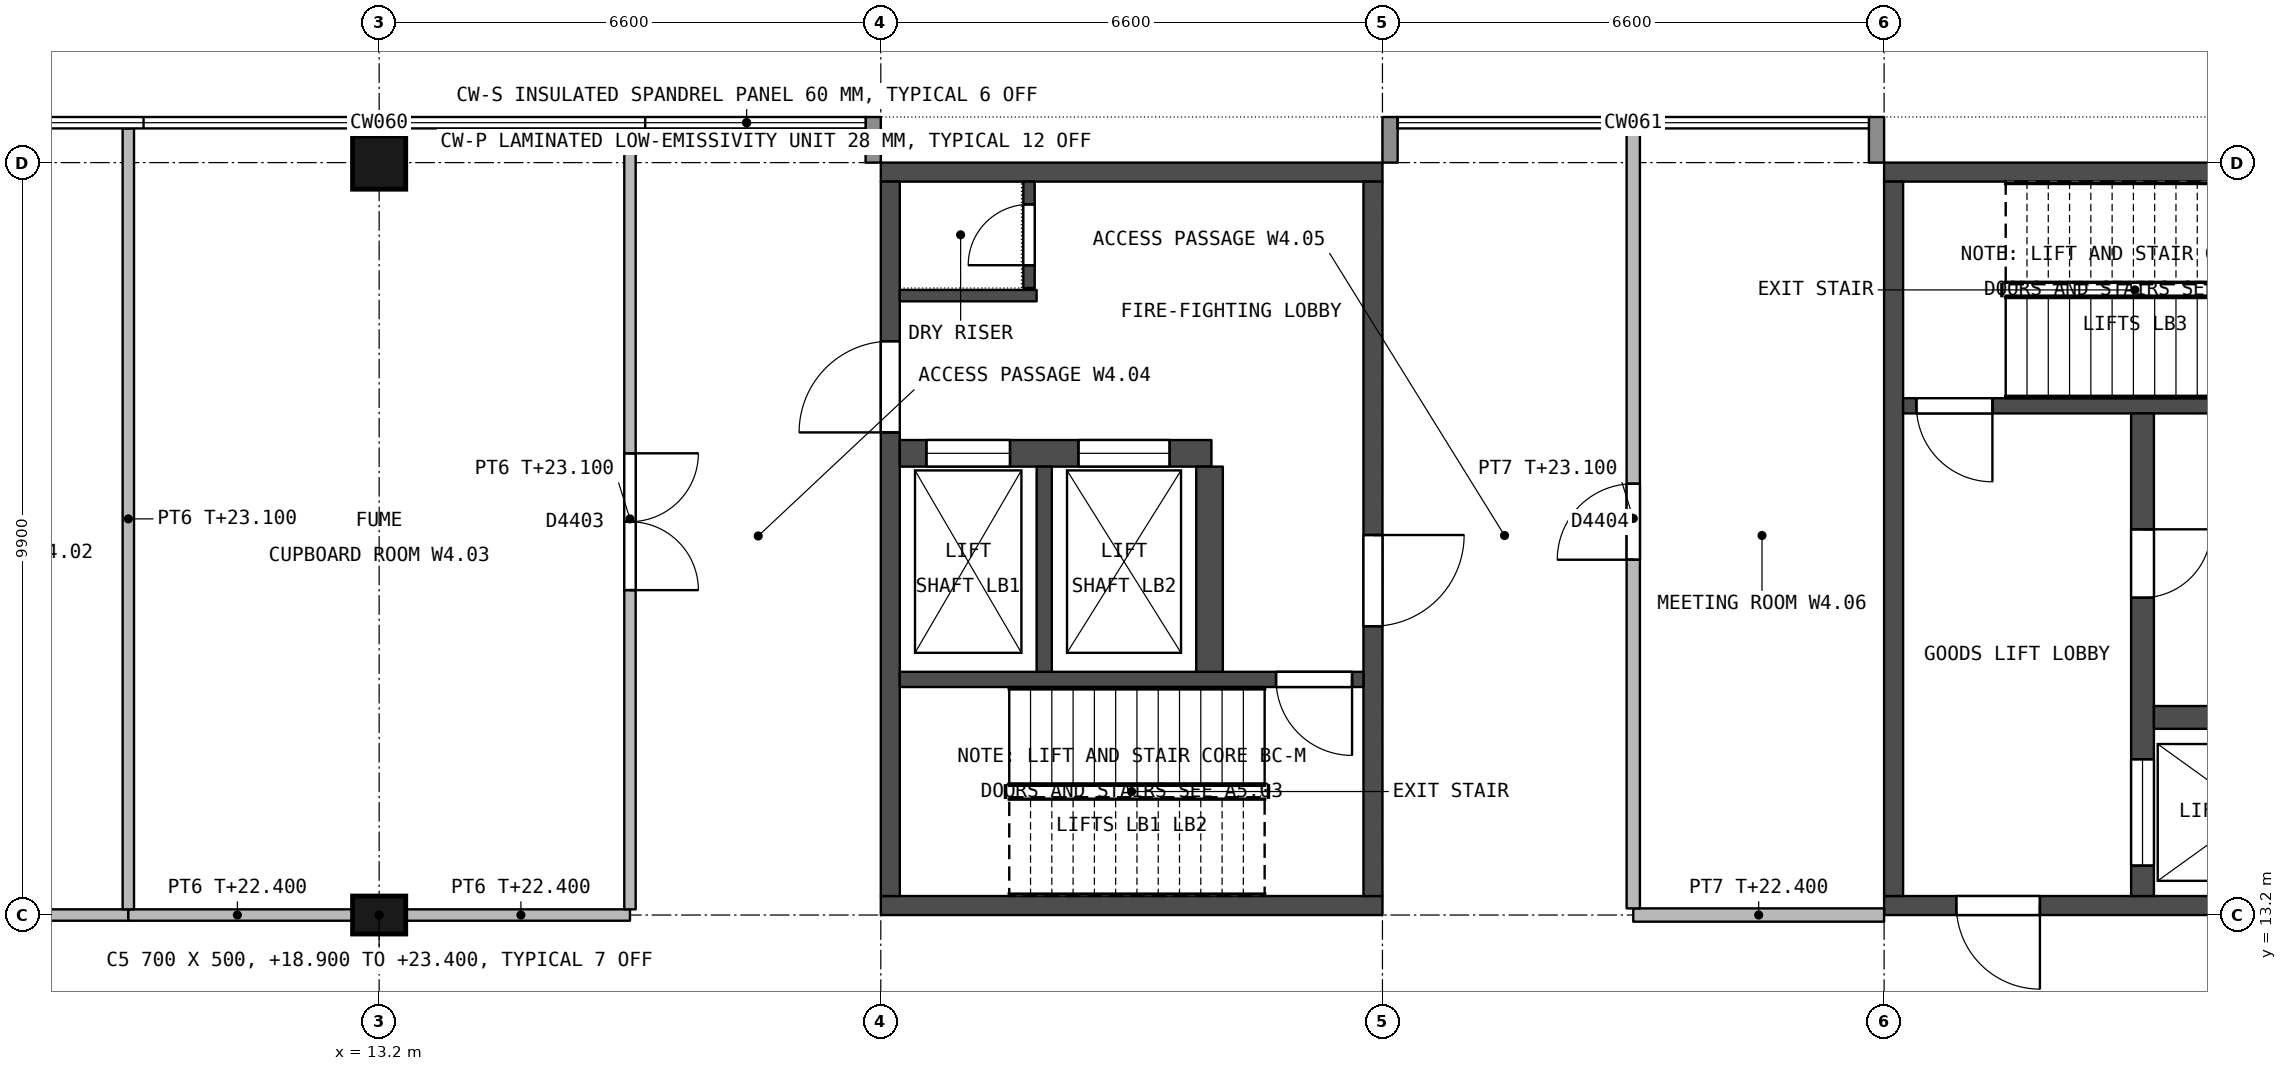
"""IFC4 building model, lengths in metres.
Left out: names, types, materials, properties, quantities, classifications, styles, units other than length and angle.
Written with IfcOpenShell. Run it as: python <this file> out.ifc"""

import sys

from ifc_helpers import new_model, si_unit, direction, frame, frame_2d, origin, origin_2d, place, context, subcontext, project, spatial, rectangle, extrude, element, fill, save


model = new_model("IFC4")
c1 = context("Model", 3, precision=1e-05, world=origin(), true_north=direction((0.0, 1.0)))
c2 = subcontext(c1, "Body", "Model", "MODEL_VIEW")
j1 = project(units=[si_unit("LENGTHUNIT", "METRE"), si_unit("PLANEANGLEUNIT", "RADIAN")], contexts=[c1])
p1 = place(None, origin())
s1 = spatial("IfcSite", under=j1, at=p1, CompositionType="ELEMENT")
p2 = place(p1, origin())
s2 = spatial("IfcBuilding", under=s1, at=p2, CompositionType="ELEMENT")
p3 = place(p2, frame((0.0, 0.0, 18.9)))
s3 = spatial("IfcBuildingStorey", under=s2, at=p3, CompositionType="ELEMENT", Elevation=18.9)
p4 = place(p3, frame((13.2, 13.2, 0.0), z_axis=(0.0, 0.0, 1.0), x_axis=(1.0, 0.0, 0.0)))
e1 = element("IfcColumn", 1, at=p4, inside=s3, PredefinedType="COLUMN", context=c2, shape_type="SweptSolid", body=[
    extrude(rectangle(XDim=0.7, YDim=0.5, at=origin_2d()), origin(), (0.0, 0.0, 1.0), 4.5),
])
p5 = place(p3, frame((13.2, 23.1, 0.0), z_axis=(0.0, 0.0, 1.0), x_axis=(1.0, 0.0, 0.0)))
e2 = element("IfcColumn", 2, at=p5, inside=s3, PredefinedType="COLUMN", context=c2, shape_type="SweptSolid", body=[
    extrude(rectangle(XDim=0.7, YDim=0.7, at=origin_2d()), origin(), (0.0, 0.0, 1.0), 4.5),
])
for number, where, z_axis, x_axis in (
    (3, (19.8, 13.325, 0.0), (0.0, 0.0, 1.0), (1.0, 0.0, 0.0)),
    (4, (19.8, 22.975, 0.0), (0.0, 0.0, 1.0), (1.0, 0.0, 0.0)),
):
    element("IfcWall", number, at=place(p3, frame(where, z_axis=z_axis, x_axis=x_axis)), inside=s3, PredefinedType="SHEAR", context=c2, shape_type="SweptSolid", body=[
        extrude(rectangle(XDim=6.6, YDim=0.25, at=frame_2d((3.3, 0.0))), origin(), (0.0, 0.0, 1.0), 4.2),
    ])
p6 = place(p3, frame((19.925, 13.45, 0.0), z_axis=(0.0, 0.0, 1.0), x_axis=(0.0, 1.0, 0.0)))
e5 = element("IfcWall", 5, at=p6, inside=s3, PredefinedType="SHEAR", context=c2, shape_type="SweptSolid", body=[
    extrude(rectangle(XDim=9.4, YDim=0.25, at=frame_2d((4.7, 0.0))), origin(), (0.0, 0.0, 1.0), 4.2),
])
p7 = place(p6, frame((6.1, 0.0, 0.0)))
e6 = element("IfcOpeningElement", 6, at=p7, cuts=e5, PredefinedType="OPENING", context=c2, shape_type="SweptSolid", body=[
    extrude(rectangle(XDim=1.2, YDim=2.1, at=frame_2d((0.6, 1.05))), frame((0.0, 0.135, 0.0), z_axis=(0.0, -1.0, 0.0), x_axis=(1.0, 0.0, 0.0)), (0.0, 0.0, 1.0), 0.27),
])
p8 = place(p3, frame((26.275, 13.45, 0.0), z_axis=(0.0, 0.0, 1.0), x_axis=(0.0, 1.0, 0.0)))
e7 = element("IfcWall", 7, at=p8, inside=s3, PredefinedType="SHEAR", context=c2, shape_type="SweptSolid", body=[
    extrude(rectangle(XDim=9.4, YDim=0.25, at=frame_2d((4.7, 0.0))), origin(), (0.0, 0.0, 1.0), 4.2),
])
p9 = place(p8, frame((3.55, 0.0, 0.0)))
e8 = element("IfcOpeningElement", 8, at=p9, cuts=e7, PredefinedType="OPENING", context=c2, shape_type="SweptSolid", body=[
    extrude(rectangle(XDim=1.2, YDim=2.1, at=frame_2d((0.6, 1.05))), frame((0.0, 0.135, 0.0), z_axis=(0.0, -1.0, 0.0), x_axis=(1.0, 0.0, 0.0)), (0.0, 0.0, 1.0), 0.27),
])
p10 = place(p3, frame((20.05, 16.3, 0.0), z_axis=(0.0, 0.0, 1.0), x_axis=(1.0, 0.0, 0.0)))
e9 = element("IfcWall", 9, at=p10, inside=s3, PredefinedType="SHEAR", context=c2, shape_type="SweptSolid", body=[
    extrude(rectangle(XDim=6.1, YDim=0.2, at=frame_2d((3.05, 0.0))), origin(), (0.0, 0.0, 1.0), 4.2),
])
p11 = place(p10, frame((4.95, 0.0, 0.0)))
e10 = element("IfcOpeningElement", 10, at=p11, cuts=e9, PredefinedType="OPENING", context=c2, shape_type="SweptSolid", body=[
    extrude(rectangle(XDim=1.0, YDim=2.2, at=frame_2d((0.5, 1.1))), frame((0.0, 0.11, 0.0), z_axis=(0.0, -1.0, 0.0), x_axis=(1.0, 0.0, 0.0)), (0.0, 0.0, 1.0), 0.22),
])
p12 = place(p3, frame((20.05, 19.275, 0.0), z_axis=(0.0, 0.0, 1.0), x_axis=(1.0, 0.0, 0.0)))
e11 = element("IfcWall", 11, at=p12, inside=s3, PredefinedType="SHEAR", context=c2, shape_type="SweptSolid", body=[
    extrude(rectangle(XDim=4.1, YDim=0.35, at=frame_2d((2.05, 0.0))), origin(), (0.0, 0.0, 1.0), 4.2),
])
p13 = place(p12, frame((0.35, 0.0, 0.0)))
e12 = element("IfcOpeningElement", 12, at=p13, cuts=e11, PredefinedType="OPENING", context=c2, shape_type="SweptSolid", body=[
    extrude(rectangle(XDim=1.1, YDim=2.2, at=frame_2d((0.55, 1.1))), frame((0.0, 0.185, 0.0), z_axis=(0.0, -1.0, 0.0), x_axis=(1.0, 0.0, 0.0)), (0.0, 0.0, 1.0), 0.37),
])
p14 = place(p12, frame((2.35, 0.0, 0.0)))
e13 = element("IfcOpeningElement", 13, at=p14, cuts=e11, PredefinedType="OPENING", context=c2, shape_type="SweptSolid", body=[
    extrude(rectangle(XDim=1.2, YDim=2.3, at=frame_2d((0.6, 1.15))), frame((0.0, 0.185, 0.0), z_axis=(0.0, -1.0, 0.0), x_axis=(1.0, 0.0, 0.0)), (0.0, 0.0, 1.0), 0.37),
])
p15 = place(p3, frame((21.95, 16.4, 0.0), z_axis=(0.0, 0.0, 1.0), x_axis=(0.0, 1.0, 0.0)))
e14 = element("IfcWall", 14, at=p15, inside=s3, PredefinedType="SHEAR", context=c2, shape_type="SweptSolid", body=[
    extrude(rectangle(XDim=2.7, YDim=0.2, at=frame_2d((1.35, 0.0))), origin(), (0.0, 0.0, 1.0), 4.2),
])
p16 = place(p3, frame((24.125, 16.4, 0.0), z_axis=(0.0, 0.0, 1.0), x_axis=(0.0, 1.0, 0.0)))
e15 = element("IfcWall", 15, at=p16, inside=s3, PredefinedType="SHEAR", context=c2, shape_type="SweptSolid", body=[
    extrude(rectangle(XDim=2.7, YDim=0.35, at=frame_2d((1.35, 0.0))), origin(), (0.0, 0.0, 1.0), 4.2),
])
p17 = place(p3, frame((20.05, 21.35, 0.0), z_axis=(0.0, 0.0, 1.0), x_axis=(1.0, 0.0, 0.0)))
e16 = element("IfcWall", 16, at=p17, inside=s3, PredefinedType="SHEAR", context=c2, shape_type="SweptSolid", body=[
    extrude(rectangle(XDim=1.8, YDim=0.15, at=frame_2d((0.9, 0.0))), origin(), (0.0, 0.0, 1.0), 4.2),
])
p18 = place(p3, frame((21.75, 21.45, 0.0), z_axis=(0.0, 0.0, 1.0), x_axis=(0.0, 1.0, 0.0)))
e17 = element("IfcWall", 17, at=p18, inside=s3, PredefinedType="SHEAR", context=c2, shape_type="SweptSolid", body=[
    extrude(rectangle(XDim=1.4, YDim=0.15, at=frame_2d((0.7, 0.0))), origin(), (0.0, 0.0, 1.0), 4.2),
])
p19 = place(p18, frame((0.3, 0.0, 0.0)))
e18 = element("IfcOpeningElement", 18, at=p19, cuts=e17, PredefinedType="OPENING", context=c2, shape_type="SweptSolid", body=[
    extrude(rectangle(XDim=0.8, YDim=2.0, at=frame_2d((0.4, 1.0))), frame((0.0, 0.085, 0.0), z_axis=(0.0, -1.0, 0.0), x_axis=(1.0, 0.0, 0.0)), (0.0, 0.0, 1.0), 0.17),
])
p20 = place(p3, frame((33.0, 13.325, 0.0), z_axis=(0.0, 0.0, 1.0), x_axis=(1.0, 0.0, 0.0)))
e19 = element("IfcWall", 19, at=p20, inside=s3, PredefinedType="SHEAR", context=c2, shape_type="SweptSolid", body=[
    extrude(rectangle(XDim=6.6, YDim=0.25, at=frame_2d((3.3, 0.0))), origin(), (0.0, 0.0, 1.0), 4.2),
])
p21 = place(p20, frame((0.95, 0.0, 0.0)))
e20 = element("IfcOpeningElement", 20, at=p21, cuts=e19, PredefinedType="OPENING", context=c2, shape_type="SweptSolid", body=[
    extrude(rectangle(XDim=1.1, YDim=2.1, at=frame_2d((0.55, 1.05))), frame((0.0, 0.135, 0.0), z_axis=(0.0, -1.0, 0.0), x_axis=(1.0, 0.0, 0.0)), (0.0, 0.0, 1.0), 0.27),
])
p22 = place(p3, frame((33.0, 22.975, 0.0), z_axis=(0.0, 0.0, 1.0), x_axis=(1.0, 0.0, 0.0)))
e21 = element("IfcWall", 21, at=p22, inside=s3, PredefinedType="SHEAR", context=c2, shape_type="SweptSolid", body=[
    extrude(rectangle(XDim=6.6, YDim=0.25, at=frame_2d((3.3, 0.0))), origin(), (0.0, 0.0, 1.0), 4.2),
])
p23 = place(p3, frame((33.125, 13.45, 0.0), z_axis=(0.0, 0.0, 1.0), x_axis=(0.0, 1.0, 0.0)))
e22 = element("IfcWall", 22, at=p23, inside=s3, PredefinedType="SHEAR", context=c2, shape_type="SweptSolid", body=[
    extrude(rectangle(XDim=9.4, YDim=0.25, at=frame_2d((4.7, 0.0))), origin(), (0.0, 0.0, 1.0), 4.2),
])
p24 = place(p3, frame((33.25, 19.9, 0.0), z_axis=(0.0, 0.0, 1.0), x_axis=(1.0, 0.0, 0.0)))
e23 = element("IfcWall", 23, at=p24, inside=s3, PredefinedType="SHEAR", context=c2, shape_type="SweptSolid", body=[
    extrude(rectangle(XDim=6.1, YDim=0.2, at=frame_2d((3.05, 0.0))), origin(), (0.0, 0.0, 1.0), 4.2),
])
p25 = place(p24, frame((0.175, 0.0, 0.0)))
e24 = element("IfcOpeningElement", 24, at=p25, cuts=e23, PredefinedType="OPENING", context=c2, shape_type="SweptSolid", body=[
    extrude(rectangle(XDim=1.0, YDim=2.1, at=frame_2d((0.5, 1.05))), frame((0.0, 0.11, 0.0), z_axis=(0.0, -1.0, 0.0), x_axis=(1.0, 0.0, 0.0)), (0.0, 0.0, 1.0), 0.22),
])
p26 = place(p3, frame((36.4, 13.45, 0.0), z_axis=(0.0, 0.0, 1.0), x_axis=(0.0, 1.0, 0.0)))
e25 = element("IfcWall", 25, at=p26, inside=s3, PredefinedType="SHEAR", context=c2, shape_type="SweptSolid", body=[
    extrude(rectangle(XDim=6.35, YDim=0.3, at=frame_2d((3.175, 0.0))), origin(), (0.0, 0.0, 1.0), 4.2),
])
p27 = place(p26, frame((3.925, 0.0, 0.0)))
e26 = element("IfcOpeningElement", 26, at=p27, cuts=e25, PredefinedType="OPENING", context=c2, shape_type="SweptSolid", body=[
    extrude(rectangle(XDim=0.9, YDim=2.1, at=frame_2d((0.45, 1.05))), frame((0.0, 0.16, 0.0), z_axis=(0.0, -1.0, 0.0), x_axis=(1.0, 0.0, 0.0)), (0.0, 0.0, 1.0), 0.32),
])
p28 = place(p26, frame((0.4, 0.0, 0.0)))
e27 = element("IfcOpeningElement", 27, at=p28, cuts=e25, PredefinedType="OPENING", context=c2, shape_type="SweptSolid", body=[
    extrude(rectangle(XDim=1.4, YDim=2.4, at=frame_2d((0.7, 1.2))), frame((0.0, 0.16, 0.0), z_axis=(0.0, -1.0, 0.0), x_axis=(1.0, 0.0, 0.0)), (0.0, 0.0, 1.0), 0.32),
])
p29 = place(p3, frame((36.55, 15.8, 0.0), z_axis=(0.0, 0.0, 1.0), x_axis=(1.0, 0.0, 0.0)))
e28 = element("IfcWall", 28, at=p29, inside=s3, PredefinedType="SHEAR", context=c2, shape_type="SweptSolid", body=[
    extrude(rectangle(XDim=2.8, YDim=0.3, at=frame_2d((1.4, 0.0))), origin(), (0.0, 0.0, 1.0), 4.2),
])
for number, where, z_axis, x_axis in (
    (29, (19.7, 23.1, 0.0), (0.0, 0.0, 1.0), (0.0, 1.0, 0.0)),
    (30, (26.5, 23.1, 0.0), (0.0, 0.0, 1.0), (0.0, 1.0, 0.0)),
    (31, (32.9, 23.1, 0.0), (0.0, 0.0, 1.0), (0.0, 1.0, 0.0)),
):
    element("IfcWall", number, at=place(p3, frame(where, z_axis=z_axis, x_axis=x_axis)), inside=s3, PredefinedType="STANDARD", context=c2, shape_type="SweptSolid", body=[
        extrude(rectangle(XDim=0.6, YDim=0.2, at=frame_2d((0.3, 0.0))), origin(), (0.0, 0.0, 1.0), 3.5),
    ])
p30 = place(p3, frame((9.9, 13.2, 0.0), z_axis=(0.0, 0.0, 1.0), x_axis=(-1.0, 0.0, 0.0)))
e32 = element("IfcWall", 32, at=p30, inside=s3, PredefinedType="PARTITIONING", context=c2, shape_type="SweptSolid", body=[
    extrude(rectangle(XDim=3.3, YDim=0.15, at=frame_2d((1.65, 0.0))), origin(), (0.0, 0.0, 1.0), 3.5),
])
p31 = place(p30, frame((1.15, 0.0, 0.0)))
e33 = element("IfcOpeningElement", 33, at=p31, cuts=e32, PredefinedType="OPENING", context=c2, shape_type="SweptSolid", body=[
    extrude(rectangle(XDim=1.0, YDim=2.1, at=frame_2d((0.5, 1.05))), frame((0.0, 0.085, 0.0), z_axis=(0.0, -1.0, 0.0), x_axis=(1.0, 0.0, 0.0)), (0.0, 0.0, 1.0), 0.17),
])
p32 = place(p3, frame((16.5, 13.2, 0.0), z_axis=(0.0, 0.0, 1.0), x_axis=(-1.0, 0.0, 0.0)))
e34 = element("IfcWall", 34, at=p32, inside=s3, PredefinedType="PARTITIONING", context=c2, shape_type="SweptSolid", body=[
    extrude(rectangle(XDim=2.95, YDim=0.15, at=frame_2d((1.475, 0.0))), origin(), (0.0, 0.0, 1.0), 3.5),
])
p33 = place(p3, frame((12.85, 13.2, 0.0), z_axis=(0.0, 0.0, 1.0), x_axis=(-1.0, 0.0, 0.0)))
e35 = element("IfcWall", 35, at=p33, inside=s3, PredefinedType="PARTITIONING", context=c2, shape_type="SweptSolid", body=[
    extrude(rectangle(XDim=2.95, YDim=0.15, at=frame_2d((1.475, 0.0))), origin(), (0.0, 0.0, 1.0), 3.5),
])
p34 = place(p3, frame((33.0, 13.2, 0.0), z_axis=(0.0, 0.0, 1.0), x_axis=(-1.0, 0.0, 0.0)))
e36 = element("IfcWall", 36, at=p34, inside=s3, PredefinedType="PARTITIONING", context=c2, shape_type="SweptSolid", body=[
    extrude(rectangle(XDim=3.3, YDim=0.175, at=frame_2d((1.65, 0.0))), origin(), (0.0, 0.0, 1.0), 3.5),
])
p35 = place(p3, frame((9.9, 13.275, 0.0), z_axis=(0.0, 0.0, 1.0), x_axis=(0.0, 1.0, 0.0)))
e37 = element("IfcWall", 37, at=p35, inside=s3, PredefinedType="PARTITIONING", context=c2, shape_type="SweptSolid", body=[
    extrude(rectangle(XDim=10.275, YDim=0.15, at=frame_2d((5.138, 0.0))), origin(), (0.0, 0.0, 1.0), 4.2),
])
p36 = place(p3, frame((16.5, 23.55, 0.0), z_axis=(0.0, 0.0, 1.0), x_axis=(0.0, -1.0, 0.0)))
e38 = element("IfcWall", 38, at=p36, inside=s3, PredefinedType="PARTITIONING", context=c2, shape_type="SweptSolid", body=[
    extrude(rectangle(XDim=10.275, YDim=0.15, at=frame_2d((5.138, 0.0))), origin(), (0.0, 0.0, 1.0), 4.2),
])
p37 = place(p36, frame((4.275, 0.0, 0.0)))
e39 = element("IfcOpeningElement", 39, at=p37, cuts=e38, PredefinedType="OPENING", context=c2, shape_type="SweptSolid", body=[
    extrude(rectangle(XDim=1.8, YDim=2.4, at=frame_2d((0.9, 1.2))), frame((0.0, 0.085, 0.0), z_axis=(0.0, -1.0, 0.0), x_axis=(1.0, 0.0, 0.0)), (0.0, 0.0, 1.0), 0.17),
])
p38 = place(p3, frame((29.7, 23.55, 0.0), z_axis=(0.0, 0.0, 1.0), x_axis=(0.0, -1.0, 0.0)))
e40 = element("IfcWall", 40, at=p38, inside=s3, PredefinedType="PARTITIONING", context=c2, shape_type="SweptSolid", body=[
    extrude(rectangle(XDim=10.262, YDim=0.175, at=frame_2d((5.131, 0.0))), origin(), (0.0, 0.0, 1.0), 4.2),
])
p39 = place(p38, frame((4.675, 0.0, 0.0)))
e41 = element("IfcOpeningElement", 41, at=p39, cuts=e40, PredefinedType="OPENING", context=c2, shape_type="SweptSolid", body=[
    extrude(rectangle(XDim=1.0, YDim=2.1, at=frame_2d((0.5, 1.05))), frame((0.0, 0.097, 0.0), z_axis=(0.0, -1.0, 0.0), x_axis=(1.0, 0.0, 0.0)), (0.0, 0.0, 1.0), 0.195),
])
p40 = place(p9, origin())
e42 = element("IfcDoor", 42, at=p40, inside=s3, OperationType="SINGLE_SWING_RIGHT", PredefinedType="DOOR", context=c2, shape_type="SweptSolid", body=[
    extrude(rectangle(XDim=1.2, YDim=2.1, at=frame_2d((0.6, 1.05))), frame((0.0, 0.025, 0.0), z_axis=(0.0, -1.0, 0.0), x_axis=(1.0, 0.0, 0.0)), (0.0, 0.0, 1.0), 0.05),
])
fill(e8, e42)
p41 = place(p7, origin())
e43 = element("IfcDoor", 43, at=p41, inside=s3, OperationType="SINGLE_SWING_LEFT", PredefinedType="DOOR", context=c2, shape_type="SweptSolid", body=[
    extrude(rectangle(XDim=1.2, YDim=2.1, at=frame_2d((0.6, 1.05))), frame((0.0, 0.025, 0.0), z_axis=(0.0, -1.0, 0.0), x_axis=(1.0, 0.0, 0.0)), (0.0, 0.0, 1.0), 0.05),
])
fill(e6, e43)
p42 = place(p11, origin())
e44 = element("IfcDoor", 44, at=p42, inside=s3, OperationType="SINGLE_SWING_RIGHT", PredefinedType="DOOR", context=c2, shape_type="SweptSolid", body=[
    extrude(rectangle(XDim=1.0, YDim=2.2, at=frame_2d((0.5, 1.1))), frame((0.0, 0.025, 0.0), z_axis=(0.0, -1.0, 0.0), x_axis=(1.0, 0.0, 0.0)), (0.0, 0.0, 1.0), 0.05),
])
fill(e10, e44)
p43 = place(p19, origin())
e45 = element("IfcDoor", 45, at=p43, inside=s3, OperationType="SINGLE_SWING_LEFT", PredefinedType="DOOR", context=c2, shape_type="SweptSolid", body=[
    extrude(rectangle(XDim=0.8, YDim=2.0, at=frame_2d((0.4, 1.0))), frame((0.0, 0.025, 0.0), z_axis=(0.0, -1.0, 0.0), x_axis=(1.0, 0.0, 0.0)), (0.0, 0.0, 1.0), 0.05),
])
fill(e18, e45)
p44 = place(p13, origin())
e46 = element("IfcDoor", 46, at=p44, inside=s3, OperationType="DOUBLE_DOOR_SLIDING", PredefinedType="NOTDEFINED", context=c2, shape_type="SweptSolid", body=[
    extrude(rectangle(XDim=1.1, YDim=2.2, at=frame_2d((0.55, 1.1))), frame((0.0, 0.025, 0.0), z_axis=(0.0, -1.0, 0.0), x_axis=(1.0, 0.0, 0.0)), (0.0, 0.0, 1.0), 0.05),
])
fill(e12, e46)
p45 = place(p14, origin())
e47 = element("IfcDoor", 47, at=p45, inside=s3, OperationType="DOUBLE_DOOR_SLIDING", PredefinedType="NOTDEFINED", context=c2, shape_type="SweptSolid", body=[
    extrude(rectangle(XDim=1.2, YDim=2.3, at=frame_2d((0.6, 1.15))), frame((0.0, 0.025, 0.0), z_axis=(0.0, -1.0, 0.0), x_axis=(1.0, 0.0, 0.0)), (0.0, 0.0, 1.0), 0.05),
])
fill(e13, e47)
p46 = place(p27, origin())
e48 = element("IfcDoor", 48, at=p46, inside=s3, OperationType="SINGLE_SWING_RIGHT", PredefinedType="DOOR", context=c2, shape_type="SweptSolid", body=[
    extrude(rectangle(XDim=0.9, YDim=2.1, at=frame_2d((0.45, 1.05))), frame((0.0, 0.025, 0.0), z_axis=(0.0, -1.0, 0.0), x_axis=(1.0, 0.0, 0.0)), (0.0, 0.0, 1.0), 0.05),
])
fill(e26, e48)
p47 = place(p21, origin())
e49 = element("IfcDoor", 49, at=p47, inside=s3, OperationType="SINGLE_SWING_RIGHT", PredefinedType="DOOR", context=c2, shape_type="SweptSolid", body=[
    extrude(rectangle(XDim=1.1, YDim=2.1, at=frame_2d((0.55, 1.05))), frame((0.0, 0.025, 0.0), z_axis=(0.0, -1.0, 0.0), x_axis=(1.0, 0.0, 0.0)), (0.0, 0.0, 1.0), 0.05),
])
fill(e20, e49)
p48 = place(p25, origin())
e50 = element("IfcDoor", 50, at=p48, inside=s3, OperationType="SINGLE_SWING_RIGHT", PredefinedType="DOOR", context=c2, shape_type="SweptSolid", body=[
    extrude(rectangle(XDim=1.0, YDim=2.1, at=frame_2d((0.5, 1.05))), frame((0.0, 0.025, 0.0), z_axis=(0.0, -1.0, 0.0), x_axis=(1.0, 0.0, 0.0)), (0.0, 0.0, 1.0), 0.05),
])
fill(e24, e50)
p49 = place(p28, origin())
e51 = element("IfcDoor", 51, at=p49, inside=s3, OperationType="DOUBLE_DOOR_SLIDING", PredefinedType="NOTDEFINED", context=c2, shape_type="SweptSolid", body=[
    extrude(rectangle(XDim=1.4, YDim=2.4, at=frame_2d((0.7, 1.2))), frame((0.0, 0.025, 0.0), z_axis=(0.0, -1.0, 0.0), x_axis=(1.0, 0.0, 0.0)), (0.0, 0.0, 1.0), 0.05),
])
fill(e27, e51)
p50 = place(p37, origin())
e52 = element("IfcDoor", 52, at=p50, inside=s3, OperationType="DOUBLE_DOOR_SINGLE_SWING", PredefinedType="DOOR", context=c2, shape_type="SweptSolid", body=[
    extrude(rectangle(XDim=1.8, YDim=2.4, at=frame_2d((0.9, 1.2))), frame((0.0, 0.027, 0.0), z_axis=(0.0, -1.0, 0.0), x_axis=(1.0, 0.0, 0.0)), (0.0, 0.0, 1.0), 0.054),
])
fill(e39, e52)
p51 = place(p39, origin())
e53 = element("IfcDoor", 53, at=p51, inside=s3, OperationType="SINGLE_SWING_RIGHT", PredefinedType="DOOR", context=c2, shape_type="SweptSolid", body=[
    extrude(rectangle(XDim=1.0, YDim=2.1, at=frame_2d((0.5, 1.05))), frame((0.0, 0.027, 0.0), z_axis=(0.0, -1.0, 0.0), x_axis=(1.0, 0.0, 0.0)), (0.0, 0.0, 1.0), 0.054),
])
fill(e41, e53)
save(model, sys.argv[1])
